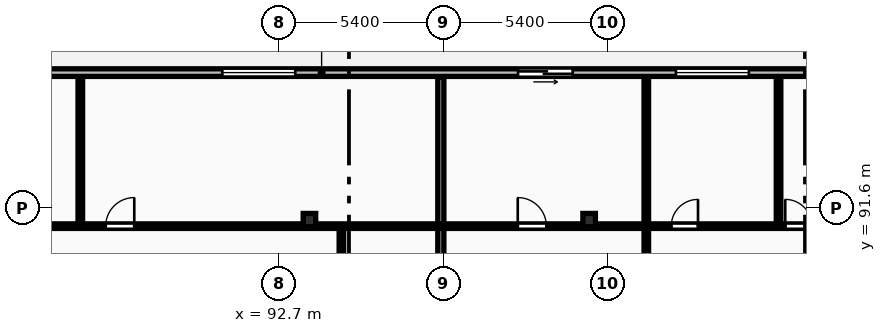
"""IFC4 building model, lengths in metres.
Left out: names, types, materials, properties, quantities, classifications, styles, units other than length and angle.
Written with IfcOpenShell. Run it as: python <this file> out.ifc"""

import sys

from ifc_helpers import new_model, si_unit, direction, frame, frame_2d, origin, origin_2d, place, context, subcontext, project, spatial, rectangle, i_section, extrude, element, fill, save


model = new_model("IFC4")
c1 = context("Model", 3, precision=1e-05, world=origin(), true_north=direction((0.0, 1.0)))
c2 = subcontext(c1, "Body", "Model", "MODEL_VIEW")
j1 = project(units=[si_unit("LENGTHUNIT", "METRE"), si_unit("PLANEANGLEUNIT", "RADIAN")], contexts=[c1])
p1 = place(None, origin())
s1 = spatial("IfcSite", under=j1, at=p1, CompositionType="ELEMENT")
p2 = place(p1, origin())
s2 = spatial("IfcBuilding", under=s1, at=p2, CompositionType="ELEMENT")
p3 = place(p2, frame((0.0, 0.0, 146.5)))
s3 = spatial("IfcBuildingStorey", under=s2, at=p3, CompositionType="ELEMENT", Elevation=146.5)
for number, where, z_axis, x_axis in (
    (1, (93.7, 91.2, 0.0), (0.0, 0.0, 1.0), (1.0, 0.0, 0.0)),
    (2, (102.9, 91.2, 0.0), (0.0, 0.0, 1.0), (1.0, 0.0, 0.0)),
):
    element("IfcColumn", number, at=place(p3, frame(where, z_axis=z_axis, x_axis=x_axis)), inside=s3, PredefinedType="COLUMN", context=c2, shape_type="SweptSolid", body=[
        extrude(i_section(OverallWidth=0.412, OverallDepth=0.437, WebThickness=0.036, FlangeThickness=0.052, FilletRadius=0.015, at=origin_2d()), origin(), (0.0, 0.0, 1.0), 3.6),
    ])
p4 = place(p3, frame((130.6, 96.05, 0.0), z_axis=(0.0, 0.0, 1.0), x_axis=(-1.0, 0.0, 0.0)))
e3 = element("IfcWall", 3, at=p4, inside=s3, PredefinedType="STANDARD", context=c2, shape_type="SweptSolid", body=[
    extrude(rectangle(XDim=73.0, YDim=0.25, at=frame_2d((36.5, 0.0))), origin(), (0.0, 0.0, 1.0), 3.31),
])
p5 = place(p4, frame((67.921, 0.0, 0.0)))
e4 = element("IfcOpeningElement", 4, at=p5, cuts=e3, PredefinedType="OPENING", context=c2, shape_type="SweptSolid", body=[
    extrude(rectangle(XDim=1.8, YDim=2.2, at=frame_2d((0.9, 1.1))), frame((0.0, 0.135, 0.0), z_axis=(0.0, -1.0, 0.0), x_axis=(1.0, 0.0, 0.0)), (0.0, 0.0, 1.0), 0.27),
])
p6 = place(p4, frame((58.084, 0.0, 0.85)))
e5 = element("IfcOpeningElement", 5, at=p6, cuts=e3, PredefinedType="OPENING", context=c2, shape_type="SweptSolid", body=[
    extrude(rectangle(XDim=2.4, YDim=1.9, at=frame_2d((1.2, 0.95))), frame((0.0, 0.135, 0.0), z_axis=(0.0, -1.0, 0.0), x_axis=(1.0, 0.0, 0.0)), (0.0, 0.0, 1.0), 0.27),
])
p7 = place(p4, frame((48.101, 0.0, 0.0)))
e6 = element("IfcOpeningElement", 6, at=p7, cuts=e3, PredefinedType="OPENING", context=c2, shape_type="SweptSolid", body=[
    extrude(rectangle(XDim=1.8, YDim=2.2, at=frame_2d((0.9, 1.1))), frame((0.0, 0.135, 0.0), z_axis=(0.0, -1.0, 0.0), x_axis=(1.0, 0.0, 0.0)), (0.0, 0.0, 1.0), 0.27),
])
p8 = place(p4, frame((37.368, 0.0, 0.85)))
e7 = element("IfcOpeningElement", 7, at=p8, cuts=e3, PredefinedType="OPENING", context=c2, shape_type="SweptSolid", body=[
    extrude(rectangle(XDim=2.4, YDim=1.9, at=frame_2d((1.2, 0.95))), frame((0.0, 0.135, 0.0), z_axis=(0.0, -1.0, 0.0), x_axis=(1.0, 0.0, 0.0)), (0.0, 0.0, 1.0), 0.27),
])
p9 = place(p4, frame((22.445, 0.0, 0.85)))
e8 = element("IfcOpeningElement", 8, at=p9, cuts=e3, PredefinedType="OPENING", context=c2, shape_type="SweptSolid", body=[
    extrude(rectangle(XDim=2.4, YDim=1.9, at=frame_2d((1.2, 0.95))), frame((0.0, 0.135, 0.0), z_axis=(0.0, -1.0, 0.0), x_axis=(1.0, 0.0, 0.0)), (0.0, 0.0, 1.0), 0.27),
])
p10 = place(p4, frame((17.845, 0.0, 0.85)))
e9 = element("IfcOpeningElement", 9, at=p10, cuts=e3, PredefinedType="OPENING", context=c2, shape_type="SweptSolid", body=[
    extrude(rectangle(XDim=2.4, YDim=1.9, at=frame_2d((1.2, 0.95))), frame((0.0, 0.135, 0.0), z_axis=(0.0, -1.0, 0.0), x_axis=(1.0, 0.0, 0.0)), (0.0, 0.0, 1.0), 0.27),
])
p11 = place(p4, frame((28.239, 0.0, 0.0)))
e10 = element("IfcOpeningElement", 10, at=p11, cuts=e3, PredefinedType="OPENING", context=c2, shape_type="SweptSolid", body=[
    extrude(rectangle(XDim=1.8, YDim=2.2, at=frame_2d((0.9, 1.1))), frame((0.0, 0.135, 0.0), z_axis=(0.0, -1.0, 0.0), x_axis=(1.0, 0.0, 0.0)), (0.0, 0.0, 1.0), 0.27),
])
p12 = place(p4, frame((14.599, 0.0, 0.85)))
e11 = element("IfcOpeningElement", 11, at=p12, cuts=e3, PredefinedType="OPENING", context=c2, shape_type="SweptSolid", body=[
    extrude(rectangle(XDim=1.8, YDim=1.8, at=frame_2d((0.9, 0.9))), frame((0.0, 0.135, 0.0), z_axis=(0.0, -1.0, 0.0), x_axis=(1.0, 0.0, 0.0)), (0.0, 0.0, 1.0), 0.27),
])
p13 = place(p4, frame((8.234, 0.0, 0.0)))
e12 = element("IfcOpeningElement", 12, at=p13, cuts=e3, PredefinedType="OPENING", context=c2, shape_type="SweptSolid", body=[
    extrude(rectangle(XDim=1.8, YDim=2.2, at=frame_2d((0.9, 1.1))), frame((0.0, 0.135, 0.0), z_axis=(0.0, -1.0, 0.0), x_axis=(1.0, 0.0, 0.0)), (0.0, 0.0, 1.0), 0.27),
])
p14 = place(p4, frame((0.9, 0.0, 0.85)))
e13 = element("IfcOpeningElement", 13, at=p14, cuts=e3, PredefinedType="OPENING", context=c2, shape_type="SweptSolid", body=[
    extrude(rectangle(XDim=2.4, YDim=1.9, at=frame_2d((1.2, 0.95))), frame((0.0, 0.135, 0.0), z_axis=(0.0, -1.0, 0.0), x_axis=(1.0, 0.0, 0.0)), (0.0, 0.0, 1.0), 0.27),
])
p15 = place(p3, frame((98.021, 69.83, 0.0), z_axis=(0.0, 0.0, 1.0), x_axis=(0.0, 1.0, 0.0)))
e14 = element("IfcWall", 14, at=p15, inside=s3, PredefinedType="PARTITIONING", context=c2, shape_type="SweptSolid", body=[
    extrude(rectangle(XDim=26.07, YDim=0.2, at=frame_2d((13.035, 0.0))), origin(), (0.0, 0.0, 1.0), 3.31),
])
p16 = place(p3, frame((94.751, 69.81, 0.0), z_axis=(0.0, 0.0, 1.0), x_axis=(0.0, 1.0, 0.0)))
e15 = element("IfcWall", 15, at=p16, inside=s3, PredefinedType="PARTITIONING", context=c2, shape_type="SweptSolid", body=[
    extrude(rectangle(XDim=21.13, YDim=0.15, at=frame_2d((10.565, 0.0))), origin(), (0.0, 0.0, 1.0), 3.31),
])
p17 = place(p16, frame((2.406, 0.0, 0.0)))
e16 = element("IfcOpeningElement", 16, at=p17, cuts=e15, PredefinedType="OPENING", context=c2, shape_type="SweptSolid", body=[
    extrude(rectangle(XDim=0.96, YDim=2.1, at=frame_2d((0.48, 1.05))), frame((0.0, 0.085, 0.0), z_axis=(0.0, -1.0, 0.0), x_axis=(1.0, 0.0, 0.0)), (0.0, 0.0, 1.0), 0.17),
])
p18 = place(p16, frame((6.133, 0.0, 0.0)))
e17 = element("IfcOpeningElement", 17, at=p18, cuts=e15, PredefinedType="OPENING", context=c2, shape_type="SweptSolid", body=[
    extrude(rectangle(XDim=0.88, YDim=2.06, at=frame_2d((0.44, 1.03))), frame((0.0, 0.085, 0.0), z_axis=(0.0, -1.0, 0.0), x_axis=(1.0, 0.0, 0.0)), (0.0, 0.0, 1.0), 0.17),
])
p19 = place(p16, frame((11.231, 0.0, 0.0)))
e18 = element("IfcOpeningElement", 18, at=p19, cuts=e15, PredefinedType="OPENING", context=c2, shape_type="SweptSolid", body=[
    extrude(rectangle(XDim=0.84, YDim=2.04, at=frame_2d((0.42, 1.02))), frame((0.0, 0.085, 0.0), z_axis=(0.0, -1.0, 0.0), x_axis=(1.0, 0.0, 0.0)), (0.0, 0.0, 1.0), 0.17),
])
p20 = place(p3, frame((86.163, 91.08, 0.0), z_axis=(0.0, 0.0, 1.0), x_axis=(0.0, 1.0, 0.0)))
e19 = element("IfcWall", 19, at=p20, inside=s3, PredefinedType="PARTITIONING", context=c2, shape_type="SweptSolid", body=[
    extrude(rectangle(XDim=4.82, YDim=0.15, at=frame_2d((2.41, 0.0))), origin(), (0.0, 0.0, 1.0), 3.31),
])
p21 = place(p3, frame((76.994, 91.0, 0.0), z_axis=(0.0, 0.0, 1.0), x_axis=(1.0, 0.0, 0.0)))
e20 = element("IfcWall", 20, at=p21, inside=s3, PredefinedType="PARTITIONING", context=c2, shape_type="SweptSolid", body=[
    extrude(rectangle(XDim=20.947, YDim=0.15, at=frame_2d((10.474, 0.0))), origin(), (0.0, 0.0, 1.0), 3.003),
])
p22 = place(p21, frame((5.042, 0.0, 0.0)))
e21 = element("IfcOpeningElement", 21, at=p22, cuts=e20, PredefinedType="OPENING", context=c2, shape_type="SweptSolid", body=[
    extrude(rectangle(XDim=0.94, YDim=2.1, at=frame_2d((0.47, 1.05))), frame((0.0, 0.085, 0.0), z_axis=(0.0, -1.0, 0.0), x_axis=(1.0, 0.0, 0.0)), (0.0, 0.0, 1.0), 0.17),
])
p23 = place(p21, frame((10.004, 0.0, 0.0)))
e22 = element("IfcOpeningElement", 22, at=p23, cuts=e20, PredefinedType="OPENING", context=c2, shape_type="SweptSolid", body=[
    extrude(rectangle(XDim=0.94, YDim=2.1, at=frame_2d((0.47, 1.05))), frame((0.0, 0.085, 0.0), z_axis=(0.0, -1.0, 0.0), x_axis=(1.0, 0.0, 0.0)), (0.0, 0.0, 1.0), 0.17),
])
p24 = place(p3, frame((109.13, 91.08, 0.0), z_axis=(0.0, 0.0, 1.0), x_axis=(0.0, 1.0, 0.0)))
e23 = element("IfcWall", 23, at=p24, inside=s3, PredefinedType="PARTITIONING", context=c2, shape_type="SweptSolid", body=[
    extrude(rectangle(XDim=4.82, YDim=0.15, at=frame_2d((2.41, 0.0))), origin(), (0.0, 0.0, 1.0), 3.31),
])
p25 = place(p3, frame((104.78, 85.94, 0.0), z_axis=(0.0, 0.0, 1.0), x_axis=(0.0, 1.0, 0.0)))
e24 = element("IfcWall", 24, at=p25, inside=s3, PredefinedType="PARTITIONING", context=c2, shape_type="SweptSolid", body=[
    extrude(rectangle(XDim=9.96, YDim=0.15, at=frame_2d((4.98, 0.0))), origin(), (0.0, 0.0, 1.0), 3.31),
])
p26 = place(p25, frame((2.936, 0.0, 0.0)))
e25 = element("IfcOpeningElement", 25, at=p26, cuts=e24, PredefinedType="OPENING", context=c2, shape_type="SweptSolid", body=[
    extrude(rectangle(XDim=0.92, YDim=2.08, at=frame_2d((0.46, 1.04))), frame((0.0, 0.085, 0.0), z_axis=(0.0, -1.0, 0.0), x_axis=(1.0, 0.0, 0.0)), (0.0, 0.0, 1.0), 0.17),
])
p27 = place(p3, frame((98.101, 91.0, 0.0), z_axis=(0.0, 0.0, 1.0), x_axis=(1.0, 0.0, 0.0)))
e26 = element("IfcWall", 26, at=p27, inside=s3, PredefinedType="PARTITIONING", context=c2, shape_type="SweptSolid", body=[
    extrude(rectangle(XDim=15.879, YDim=0.15, at=frame_2d((7.939, 0.0))), origin(), (0.0, 0.0, 1.0), 3.003),
])
p28 = place(p27, frame((2.45, 0.0, 0.0)))
e27 = element("IfcOpeningElement", 27, at=p28, cuts=e26, PredefinedType="OPENING", context=c2, shape_type="SweptSolid", body=[
    extrude(rectangle(XDim=0.94, YDim=2.1, at=frame_2d((0.47, 1.05))), frame((0.0, 0.085, 0.0), z_axis=(0.0, -1.0, 0.0), x_axis=(1.0, 0.0, 0.0)), (0.0, 0.0, 1.0), 0.17),
])
p29 = place(p27, frame((7.499, 0.0, 0.0)))
e28 = element("IfcOpeningElement", 28, at=p29, cuts=e26, PredefinedType="OPENING", context=c2, shape_type="SweptSolid", body=[
    extrude(rectangle(XDim=0.88, YDim=2.06, at=frame_2d((0.44, 1.03))), frame((0.0, 0.085, 0.0), z_axis=(0.0, -1.0, 0.0), x_axis=(1.0, 0.0, 0.0)), (0.0, 0.0, 1.0), 0.17),
])
p30 = place(p27, frame((11.249, 0.0, 0.0)))
e29 = element("IfcOpeningElement", 29, at=p30, cuts=e26, PredefinedType="OPENING", context=c2, shape_type="SweptSolid", body=[
    extrude(rectangle(XDim=0.88, YDim=2.06, at=frame_2d((0.44, 1.03))), frame((0.0, 0.085, 0.0), z_axis=(0.0, -1.0, 0.0), x_axis=(1.0, 0.0, 0.0)), (0.0, 0.0, 1.0), 0.17),
])
p31 = place(p8, origin())
e30 = element("IfcWindow", 30, at=p31, inside=s3, PartitioningType="DOUBLE_PANEL_VERTICAL", PredefinedType="WINDOW", context=c2, shape_type="SweptSolid", body=[
    extrude(rectangle(XDim=2.4, YDim=1.9, at=frame_2d((1.2, 0.95))), frame((0.0, 0.03, 0.0), z_axis=(0.0, -1.0, 0.0), x_axis=(1.0, 0.0, 0.0)), (0.0, 0.0, 1.0), 0.06),
])
fill(e7, e30)
p32 = place(p9, origin())
e31 = element("IfcWindow", 31, at=p32, inside=s3, PartitioningType="DOUBLE_PANEL_VERTICAL", PredefinedType="WINDOW", context=c2, shape_type="SweptSolid", body=[
    extrude(rectangle(XDim=2.4, YDim=1.9, at=frame_2d((1.2, 0.95))), frame((0.0, 0.03, 0.0), z_axis=(0.0, -1.0, 0.0), x_axis=(1.0, 0.0, 0.0)), (0.0, 0.0, 1.0), 0.06),
])
fill(e8, e31)
p33 = place(p11, origin())
e32 = element("IfcDoor", 32, at=p33, inside=s3, OperationType="SLIDING_TO_LEFT", PredefinedType="DOOR", context=c2, shape_type="SweptSolid", body=[
    extrude(rectangle(XDim=1.8, YDim=2.2, at=frame_2d((0.9, 1.1))), frame((0.0, 0.025, 0.0), z_axis=(0.0, -1.0, 0.0), x_axis=(1.0, 0.0, 0.0)), (0.0, 0.0, 1.0), 0.05),
])
fill(e10, e32)
p34 = place(p23, origin())
e33 = element("IfcDoor", 33, at=p34, inside=s3, OperationType="SINGLE_SWING_RIGHT", PredefinedType="DOOR", context=c2, shape_type="SweptSolid", body=[
    extrude(rectangle(XDim=0.94, YDim=2.1, at=frame_2d((0.47, 1.05))), frame((0.0, 0.025, 0.0), z_axis=(0.0, -1.0, 0.0), x_axis=(1.0, 0.0, 0.0)), (0.0, 0.0, 1.0), 0.05),
])
fill(e22, e33)
p35 = place(p28, origin())
e34 = element("IfcDoor", 34, at=p35, inside=s3, OperationType="SINGLE_SWING_LEFT", PredefinedType="DOOR", context=c2, shape_type="SweptSolid", body=[
    extrude(rectangle(XDim=0.94, YDim=2.1, at=frame_2d((0.47, 1.05))), frame((0.0, 0.025, 0.0), z_axis=(0.0, -1.0, 0.0), x_axis=(1.0, 0.0, 0.0)), (0.0, 0.0, 1.0), 0.05),
])
fill(e27, e34)
p36 = place(p29, origin())
e35 = element("IfcDoor", 35, at=p36, inside=s3, OperationType="SINGLE_SWING_RIGHT", PredefinedType="DOOR", context=c2, shape_type="SweptSolid", body=[
    extrude(rectangle(XDim=0.88, YDim=2.06, at=frame_2d((0.44, 1.03))), frame((0.0, 0.025, 0.0), z_axis=(0.0, -1.0, 0.0), x_axis=(1.0, 0.0, 0.0)), (0.0, 0.0, 1.0), 0.05),
])
fill(e28, e35)
p37 = place(p30, origin())
e36 = element("IfcDoor", 36, at=p37, inside=s3, OperationType="SINGLE_SWING_LEFT", PredefinedType="DOOR", context=c2, shape_type="SweptSolid", body=[
    extrude(rectangle(XDim=0.88, YDim=2.06, at=frame_2d((0.44, 1.03))), frame((0.0, 0.025, 0.0), z_axis=(0.0, -1.0, 0.0), x_axis=(1.0, 0.0, 0.0)), (0.0, 0.0, 1.0), 0.05),
])
fill(e29, e36)
save(model, sys.argv[1])
